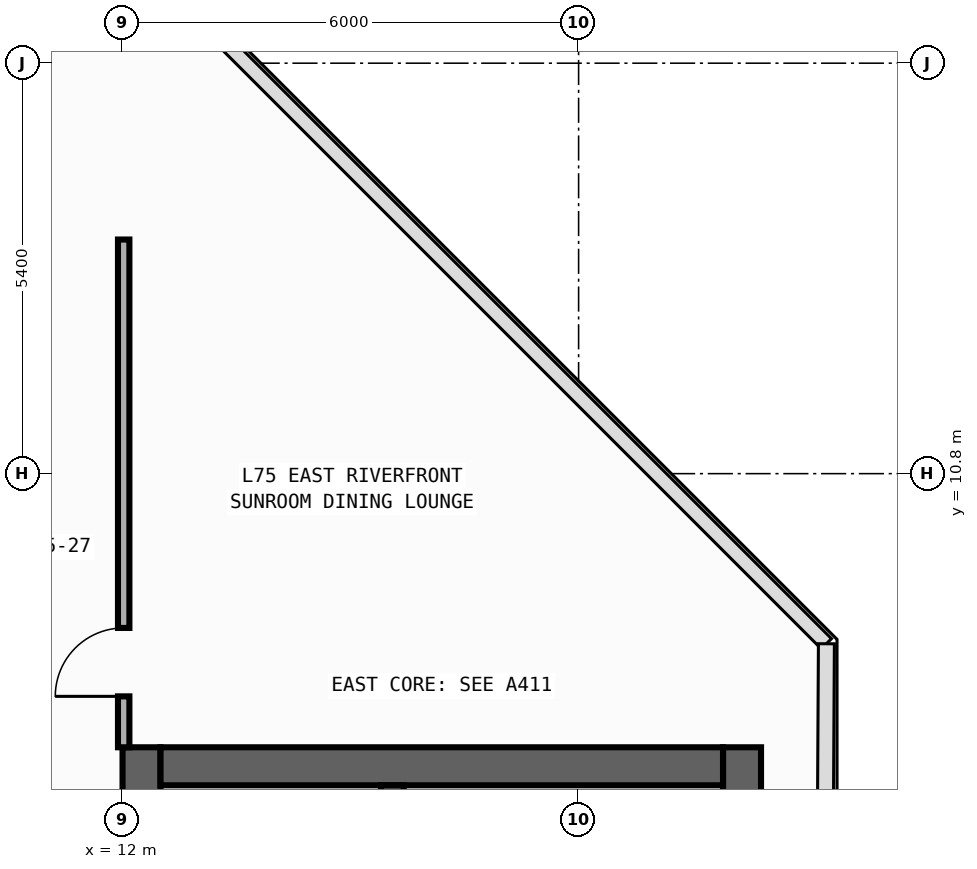
"""IFC4 building model, lengths in metres.
Left out: names, types, materials, properties, quantities, classifications, styles, units other than length and angle.
Written with IfcOpenShell. Run it as: python <this file> out.ifc"""

import sys

from ifc_helpers import new_model, si_unit, direction, frame, frame_2d, origin, place, context, subcontext, project, spatial, rectangle, extrude, element, fill, save


model = new_model("IFC4")
c1 = context("Model", 3, precision=1e-05, world=origin(), true_north=direction((0.0, 1.0)))
c2 = subcontext(c1, "Body", "Model", "MODEL_VIEW")
j1 = project(units=[si_unit("LENGTHUNIT", "METRE"), si_unit("PLANEANGLEUNIT", "RADIAN")], contexts=[c1])
p1 = place(None, origin())
s1 = spatial("IfcSite", under=j1, at=p1, CompositionType="ELEMENT")
p2 = place(p1, origin())
s2 = spatial("IfcBuilding", under=s1, at=p2, CompositionType="ELEMENT")
p3 = place(p2, frame((0.0, 0.0, 311.8)))
s3 = spatial("IfcBuildingStorey", under=s2, at=p3, CompositionType="ELEMENT", Elevation=311.8)
p4 = place(p3, frame((12.25, -19.8, 0.0), z_axis=(0.0, 0.0, 1.0), x_axis=(0.0, 1.0, 0.0)))
e1 = element("IfcWall", 1, at=p4, inside=s3, PredefinedType="SHEAR", context=c2, shape_type="SweptSolid", body=[
    extrude(rectangle(XDim=27.0, YDim=0.5, at=frame_2d((13.5, 0.0))), origin(), (0.0, 0.0, 1.0), 3.54),
])
p5 = place(p4, frame((23.05, 0.0, 0.0)))
e2 = element("IfcOpeningElement", 2, at=p5, cuts=e1, PredefinedType="OPENING", context=c2, shape_type="SweptSolid", body=[
    extrude(rectangle(XDim=1.1, YDim=2.2, at=frame_2d((0.55, 1.1))), frame((0.0, 0.26, 0.0), z_axis=(0.0, -1.0, 0.0), x_axis=(1.0, 0.0, 0.0)), (0.0, 0.0, 1.0), 0.52),
])
p6 = place(p4, frame((19.85, 0.0, 0.0)))
e3 = element("IfcOpeningElement", 3, at=p6, cuts=e1, PredefinedType="OPENING", context=c2, shape_type="SweptSolid", body=[
    extrude(rectangle(XDim=1.1, YDim=2.2, at=frame_2d((0.55, 1.1))), frame((0.0, 0.26, 0.0), z_axis=(0.0, -1.0, 0.0), x_axis=(1.0, 0.0, 0.0)), (0.0, 0.0, 1.0), 0.52),
])
p7 = place(p4, frame((16.65, 0.0, 0.0)))
e4 = element("IfcOpeningElement", 4, at=p7, cuts=e1, PredefinedType="OPENING", context=c2, shape_type="SweptSolid", body=[
    extrude(rectangle(XDim=1.1, YDim=2.2, at=frame_2d((0.55, 1.1))), frame((0.0, 0.26, 0.0), z_axis=(0.0, -1.0, 0.0), x_axis=(1.0, 0.0, 0.0)), (0.0, 0.0, 1.0), 0.52),
])
p8 = place(p4, frame((10.175, 0.0, 0.0)))
e5 = element("IfcOpeningElement", 5, at=p8, cuts=e1, PredefinedType="OPENING", context=c2, shape_type="SweptSolid", body=[
    extrude(rectangle(XDim=0.85, YDim=2.1, at=frame_2d((0.425, 1.05))), frame((0.0, 0.26, 0.0), z_axis=(0.0, -1.0, 0.0), x_axis=(1.0, 0.0, 0.0)), (0.0, 0.0, 1.0), 0.52),
])
p9 = place(p4, frame((12.725, 0.0, 0.0)))
e6 = element("IfcOpeningElement", 6, at=p9, cuts=e1, PredefinedType="OPENING", context=c2, shape_type="SweptSolid", body=[
    extrude(rectangle(XDim=1.15, YDim=2.2, at=frame_2d((0.575, 1.1))), frame((0.0, 0.26, 0.0), z_axis=(0.0, -1.0, 0.0), x_axis=(1.0, 0.0, 0.0)), (0.0, 0.0, 1.0), 0.52),
])
p10 = place(p4, frame((25.125, 0.0, 0.0)))
e7 = element("IfcOpeningElement", 7, at=p10, cuts=e1, PredefinedType="OPENING", context=c2, shape_type="SweptSolid", body=[
    extrude(rectangle(XDim=0.85, YDim=2.1, at=frame_2d((0.425, 1.05))), frame((0.0, 0.26, 0.0), z_axis=(0.0, -1.0, 0.0), x_axis=(1.0, 0.0, 0.0)), (0.0, 0.0, 1.0), 0.52),
])
p11 = place(p3, frame((20.15, -19.8, 0.0), z_axis=(0.0, 0.0, 1.0), x_axis=(0.0, 1.0, 0.0)))
e8 = element("IfcWall", 8, at=p11, inside=s3, PredefinedType="SHEAR", context=c2, shape_type="SweptSolid", body=[
    extrude(rectangle(XDim=27.0, YDim=0.5, at=frame_2d((13.5, 0.0))), origin(), (0.0, 0.0, 1.0), 3.54),
])
p12 = place(p3, frame((12.5, 6.95, 0.0), z_axis=(0.0, 0.0, 1.0), x_axis=(1.0, 0.0, 0.0)))
e9 = element("IfcWall", 9, at=p12, inside=s3, PredefinedType="SHEAR", context=c2, shape_type="SweptSolid", body=[
    extrude(rectangle(XDim=7.4, YDim=0.5, at=frame_2d((3.7, 0.0))), origin(), (0.0, 0.0, 1.0), 3.54),
])
p13 = place(p3, frame((15.55, -19.3, 0.0), z_axis=(0.0, 0.0, 1.0), x_axis=(0.0, 1.0, 0.0)))
e10 = element("IfcWall", 10, at=p13, inside=s3, PredefinedType="SHEAR", context=c2, shape_type="SweptSolid", body=[
    extrude(rectangle(XDim=26.0, YDim=0.3, at=frame_2d((13.0, 0.0))), origin(), (0.0, 0.0, 1.0), 3.54),
])
p14 = place(p13, frame((12.225, 0.0, 0.0)))
e11 = element("IfcOpeningElement", 11, at=p14, cuts=e10, PredefinedType="OPENING", context=c2, shape_type="SweptSolid", body=[
    extrude(rectangle(XDim=1.15, YDim=2.2, at=frame_2d((0.575, 1.1))), frame((0.0, 0.16, 0.0), z_axis=(0.0, -1.0, 0.0), x_axis=(1.0, 0.0, 0.0)), (0.0, 0.0, 1.0), 0.32),
])
p15 = place(p13, frame((24.625, 0.0, 0.0)))
e12 = element("IfcOpeningElement", 12, at=p15, cuts=e10, PredefinedType="OPENING", context=c2, shape_type="SweptSolid", body=[
    extrude(rectangle(XDim=0.85, YDim=2.1, at=frame_2d((0.425, 1.05))), frame((0.0, 0.16, 0.0), z_axis=(0.0, -1.0, 0.0), x_axis=(1.0, 0.0, 0.0)), (0.0, 0.0, 1.0), 0.32),
])
p16 = place(p3, frame((12.015, 7.2, 0.0), z_axis=(0.0, 0.0, 1.0), x_axis=(0.0, 1.0, 0.0)))
e13 = element("IfcWall", 13, at=p16, inside=s3, PredefinedType="PARTITIONING", context=c2, shape_type="SweptSolid", body=[
    extrude(rectangle(XDim=6.68, YDim=0.15, at=frame_2d((3.34, 0.0))), origin(), (0.0, 0.0, 1.0), 3.54),
])
p17 = place(p16, frame((0.67, 0.0, 0.0)))
e14 = element("IfcOpeningElement", 14, at=p17, cuts=e13, PredefinedType="OPENING", context=c2, shape_type="SweptSolid", body=[
    extrude(rectangle(XDim=0.9, YDim=2.15, at=frame_2d((0.45, 1.075))), frame((0.0, 0.085, 0.0), z_axis=(0.0, -1.0, 0.0), x_axis=(1.0, 0.0, 0.0)), (0.0, 0.0, 1.0), 0.17),
])
p18 = place(p17, origin())
e15 = element("IfcDoor", 15, at=p18, inside=s3, OperationType="SINGLE_SWING_LEFT", PredefinedType="DOOR", context=c2, shape_type="SweptSolid", body=[
    extrude(rectangle(XDim=0.9, YDim=2.15, at=frame_2d((0.45, 1.075))), frame((0.0, 0.025, 0.0), z_axis=(0.0, -1.0, 0.0), x_axis=(1.0, 0.0, 0.0)), (0.0, 0.0, 1.0), 0.05),
])
fill(e14, e15)
save(model, sys.argv[1])
